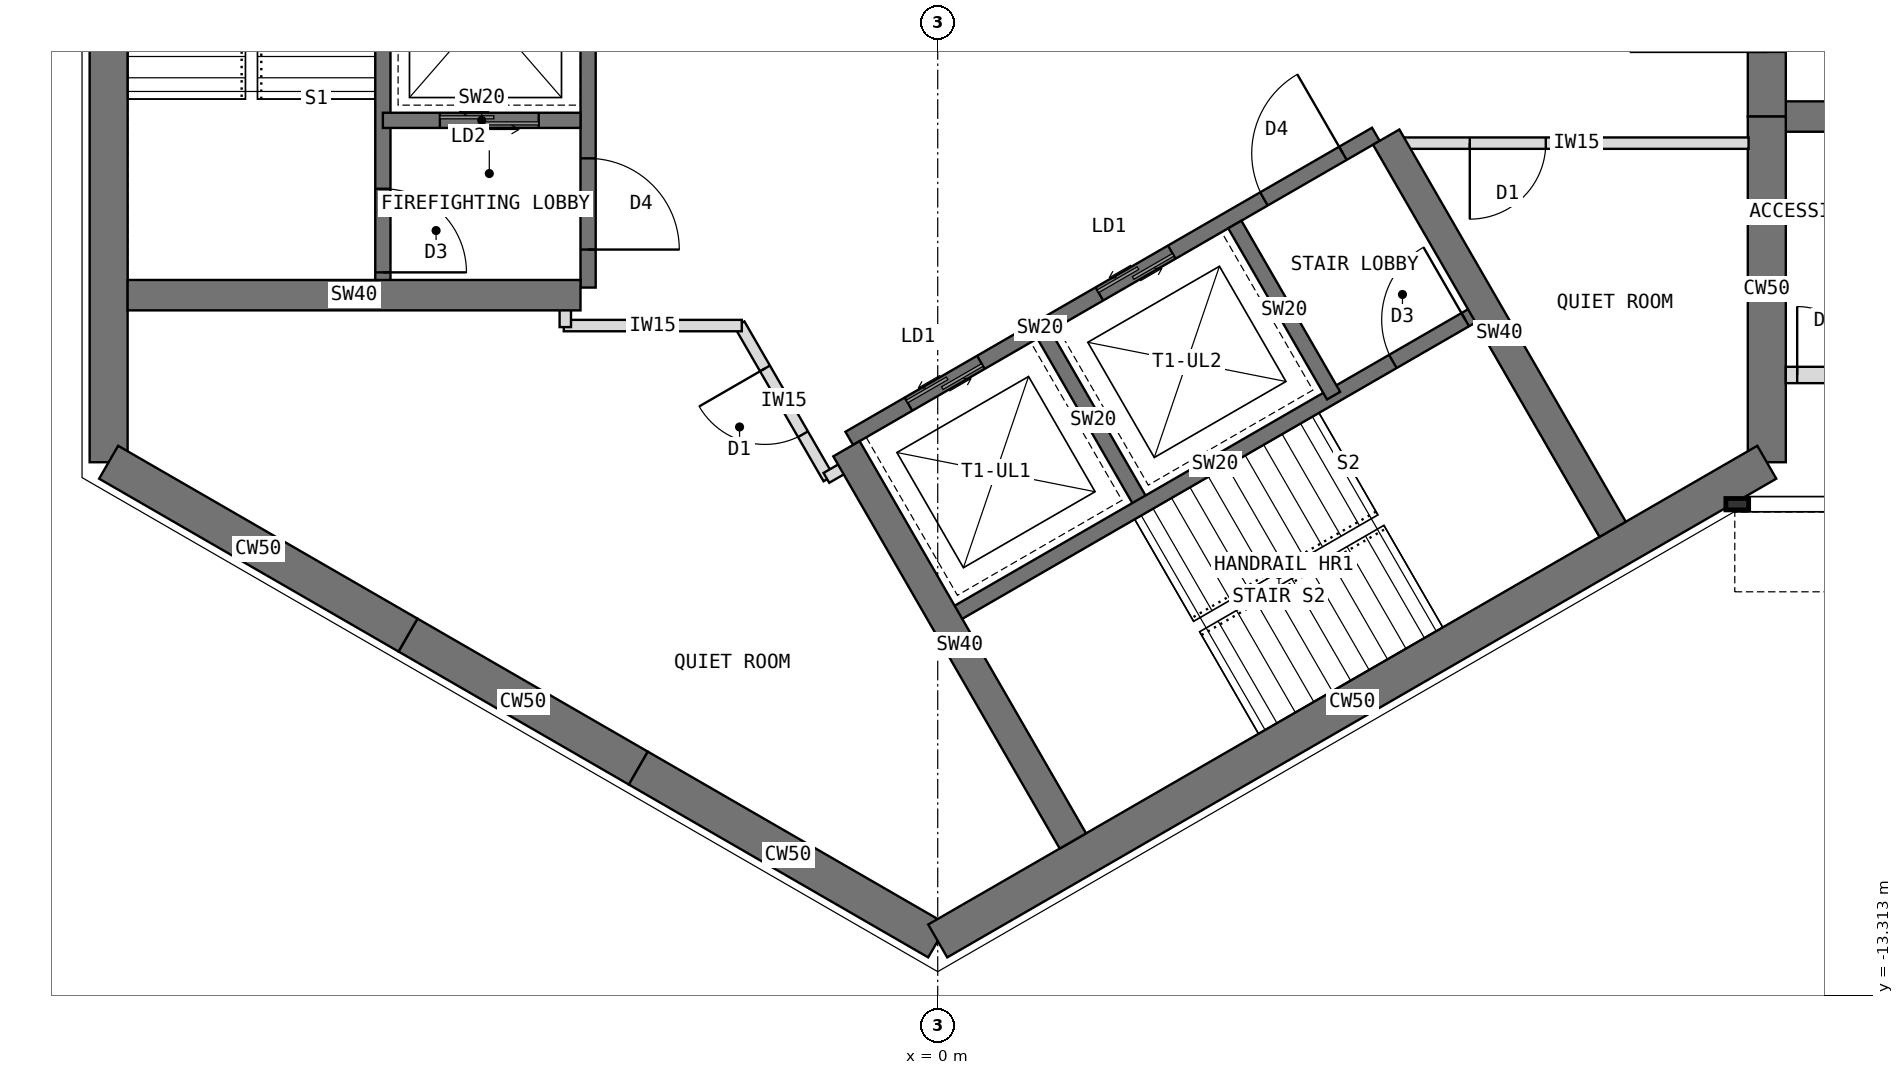
"""IFC4 building model, lengths in metres.
Left out: names, types, materials, properties, quantities, classifications, styles, units other than length and angle.
Written with IfcOpenShell. Run it as: python <this file> out.ifc"""

import sys

from ifc_helpers import new_model, si_unit, direction, frame, frame_2d, origin, place, context, subcontext, project, spatial, rectangle, extrude, element, fill, save


model = new_model("IFC4")
c1 = context("Model", 3, precision=1e-05, world=origin(), true_north=direction((0.0, 1.0)))
c2 = subcontext(c1, "Body", "Model", "MODEL_VIEW")
j1 = project(units=[si_unit("LENGTHUNIT", "METRE"), si_unit("PLANEANGLEUNIT", "RADIAN")], contexts=[c1])
p1 = place(None, origin())
s1 = spatial("IfcSite", under=j1, at=p1, CompositionType="ELEMENT")
p2 = place(p1, origin())
s2 = spatial("IfcBuilding", under=s1, at=p2, CompositionType="ELEMENT")
p3 = place(p2, frame((0.0, 0.0, 186.5)))
s3 = spatial("IfcBuildingStorey", under=s2, at=p3, CompositionType="ELEMENT", Elevation=186.5)
p4 = place(p3, frame((10.908, -6.298, 0.0), z_axis=(0.0, 0.0, 1.0), x_axis=(0.0, 1.0, 0.0)))
e1 = element("IfcWall", 1, at=p4, inside=s3, PredefinedType="SHEAR", context=c2, shape_type="SweptSolid", body=[
    extrude(rectangle(XDim=4.548, YDim=0.5, at=frame_2d((2.274, 0.0))), origin(), (0.0, 0.0, 1.0), 4.0),
])
p5 = place(p3, frame((10.908, -1.75, 0.0), z_axis=(0.0, 0.0, 1.0), x_axis=(0.0, 1.0, 0.0)))
e2 = element("IfcWall", 2, at=p5, inside=s3, PredefinedType="SHEAR", context=c2, shape_type="SweptSolid", body=[
    extrude(rectangle(XDim=3.5, YDim=0.5, at=frame_2d((1.75, 0.0))), origin(), (0.0, 0.0, 1.0), 4.0),
])
p6 = place(p5, frame((0.85, 0.0, 0.0)))
e3 = element("IfcOpeningElement", 3, at=p6, cuts=e2, PredefinedType="OPENING", context=c2, shape_type="SweptSolid", body=[
    extrude(rectangle(XDim=1.8, YDim=2.1, at=frame_2d((0.9, 1.05))), frame((0.0, 0.26, 0.0), z_axis=(0.0, -1.0, 0.0), x_axis=(1.0, 0.0, 0.0)), (0.0, 0.0, 1.0), 0.52),
])
p7 = place(p3, frame((-10.908, 6.298, 0.0), z_axis=(0.0, 0.0, 1.0), x_axis=(0.0, -1.0, 0.0)))
e4 = element("IfcWall", 4, at=p7, inside=s3, PredefinedType="SHEAR", context=c2, shape_type="SweptSolid", body=[
    extrude(rectangle(XDim=12.596, YDim=0.5, at=frame_2d((6.298, 0.0))), origin(), (0.0, 0.0, 1.0), 4.0),
])
p8 = place(p3, frame((-10.908, -6.298, 0.0), z_axis=(0.0, 0.0, 1.0), x_axis=(0.866034513004, -0.499984222037, 0.0)))
e5 = element("IfcWall", 5, at=p8, inside=s3, PredefinedType="SHEAR", context=c2, shape_type="SweptSolid", body=[
    extrude(rectangle(XDim=4.548, YDim=0.5, at=frame_2d((2.274, 0.0))), origin(), (0.0, 0.0, 1.0), 4.0),
])
p9 = place(p3, frame((-6.97, -8.572, 0.0), z_axis=(0.0, 0.0, 1.0), x_axis=(0.866019471182, -0.500010275428, 0.0)))
e6 = element("IfcWall", 6, at=p9, inside=s3, PredefinedType="SHEAR", context=c2, shape_type="SweptSolid", body=[
    extrude(rectangle(XDim=3.5, YDim=0.5, at=frame_2d((1.75, 0.0))), origin(), (0.0, 0.0, 1.0), 4.0),
])
p10 = place(p3, frame((-3.939, -10.322, 0.0), z_axis=(0.0, 0.0, 1.0), x_axis=(0.866011268655, -0.500024481964, 0.0)))
e7 = element("IfcWall", 7, at=p10, inside=s3, PredefinedType="SHEAR", context=c2, shape_type="SweptSolid", body=[
    extrude(rectangle(XDim=4.548, YDim=0.5, at=frame_2d((2.274, 0.0))), origin(), (0.0, 0.0, 1.0), 4.0),
])
p11 = place(p3, frame((0.0, -12.596, 0.0), z_axis=(0.0, 0.0, 1.0), x_axis=(0.866021940709, 0.500005998175, 0.0)))
e8 = element("IfcWall", 8, at=p11, inside=s3, PredefinedType="SHEAR", context=c2, shape_type="SweptSolid", body=[
    extrude(rectangle(XDim=12.596, YDim=0.5, at=frame_2d((6.298, 0.0))), origin(), (0.0, 0.0, 1.0), 4.0),
])
p12 = place(p3, frame((10.908, -1.75, 0.0), z_axis=(0.0, 0.0, 1.0), x_axis=(1.0, 0.0, 0.0)))
e9 = element("IfcWall", 9, at=p12, inside=s3, PredefinedType="SHEAR", context=c2, shape_type="SweptSolid", body=[
    extrude(rectangle(XDim=2.592, YDim=0.4, at=frame_2d((1.296, 0.0))), origin(), (0.0, 0.0, 1.0), 4.0),
])
p13 = place(p3, frame((-4.6, 4.0, 0.0), z_axis=(0.0, 0.0, 1.0), x_axis=(0.0, -1.0, 0.0)))
e10 = element("IfcWall", 10, at=p13, inside=s3, PredefinedType="SHEAR", context=c2, shape_type="SweptSolid", body=[
    extrude(rectangle(XDim=8.0, YDim=0.2, at=frame_2d((4.0, 0.0))), origin(), (0.0, 0.0, 1.0), 4.0),
])
p14 = place(p13, frame((6.3, 0.0, 0.0)))
e11 = element("IfcOpeningElement", 11, at=p14, cuts=e10, PredefinedType="OPENING", context=c2, shape_type="SweptSolid", body=[
    extrude(rectangle(XDim=1.2, YDim=2.1, at=frame_2d((0.6, 1.05))), frame((0.0, 0.11, 0.0), z_axis=(0.0, -1.0, 0.0), x_axis=(1.0, 0.0, 0.0)), (0.0, 0.0, 1.0), 0.22),
])
p15 = place(p13, frame((0.9, 0.0, 0.0)))
e12 = element("IfcOpeningElement", 12, at=p15, cuts=e10, PredefinedType="OPENING", context=c2, shape_type="SweptSolid", body=[
    extrude(rectangle(XDim=1.1, YDim=2.2, at=frame_2d((0.55, 1.1))), frame((0.0, 0.11, 0.0), z_axis=(0.0, -1.0, 0.0), x_axis=(1.0, 0.0, 0.0)), (0.0, 0.0, 1.0), 0.22),
])
p16 = place(p3, frame((-4.7, -1.8, 0.0), z_axis=(0.0, 0.0, 1.0), x_axis=(-1.0, 0.0, 0.0)))
e13 = element("IfcWall", 13, at=p16, inside=s3, PredefinedType="SHEAR", context=c2, shape_type="SweptSolid", body=[
    extrude(rectangle(XDim=2.6, YDim=0.2, at=frame_2d((1.3, 0.0))), origin(), (0.0, 0.0, 1.0), 4.0),
])
p17 = place(p16, frame((0.55, 0.0, 0.0)))
e14 = element("IfcOpeningElement", 14, at=p17, cuts=e13, PredefinedType="OPENING", context=c2, shape_type="SweptSolid", body=[
    extrude(rectangle(XDim=1.3, YDim=2.2, at=frame_2d((0.65, 1.1))), frame((0.0, 0.11, 0.0), z_axis=(0.0, -1.0, 0.0), x_axis=(1.0, 0.0, 0.0)), (0.0, 0.0, 1.0), 0.22),
])
p18 = place(p3, frame((-7.3, 4.0, 0.0), z_axis=(0.0, 0.0, 1.0), x_axis=(0.0, -1.0, 0.0)))
e15 = element("IfcWall", 15, at=p18, inside=s3, PredefinedType="SHEAR", context=c2, shape_type="SweptSolid", body=[
    extrude(rectangle(XDim=8.0, YDim=0.2, at=frame_2d((4.0, 0.0))), origin(), (0.0, 0.0, 1.0), 4.0),
])
p19 = place(p18, frame((6.7, 0.0, 0.0)))
e16 = element("IfcOpeningElement", 16, at=p19, cuts=e15, PredefinedType="OPENING", context=c2, shape_type="SweptSolid", body=[
    extrude(rectangle(XDim=1.1, YDim=2.1, at=frame_2d((0.55, 1.05))), frame((0.0, 0.11, 0.0), z_axis=(0.0, -1.0, 0.0), x_axis=(1.0, 0.0, 0.0)), (0.0, 0.0, 1.0), 0.22),
])
p20 = place(p3, frame((-4.7, -4.1, 0.0), z_axis=(0.0, 0.0, 1.0), x_axis=(-1.0, 0.0, 0.0)))
e17 = element("IfcWall", 17, at=p20, inside=s3, PredefinedType="SHEAR", context=c2, shape_type="SweptSolid", body=[
    extrude(rectangle(XDim=5.958, YDim=0.4, at=frame_2d((2.979, 0.0))), origin(), (0.0, 0.0, 1.0), 4.0),
])
p21 = place(p3, frame((-1.164, -5.984, 0.0), z_axis=(0.0, 0.0, 1.0), x_axis=(0.866026010844, 0.49999894854, 0.0)))
e18 = element("IfcWall", 18, at=p21, inside=s3, PredefinedType="SHEAR", context=c2, shape_type="SweptSolid", body=[
    extrude(rectangle(XDim=8.0, YDim=0.2, at=frame_2d((4.0, 0.0))), origin(), (0.0, 0.0, 1.0), 4.0),
])
p22 = place(p21, frame((6.3, 0.0, 0.0)))
e19 = element("IfcOpeningElement", 19, at=p22, cuts=e18, PredefinedType="OPENING", context=c2, shape_type="SweptSolid", body=[
    extrude(rectangle(XDim=1.2, YDim=2.1, at=frame_2d((0.6, 1.05))), frame((0.0, 0.11, 0.0), z_axis=(0.0, -1.0, 0.0), x_axis=(1.0, 0.0, 0.0)), (0.0, 0.0, 1.0), 0.22),
])
p23 = place(p21, frame((0.9, 0.0, 0.0)))
e20 = element("IfcOpeningElement", 20, at=p23, cuts=e18, PredefinedType="OPENING", context=c2, shape_type="SweptSolid", body=[
    extrude(rectangle(XDim=1.1, YDim=2.2, at=frame_2d((0.55, 1.1))), frame((0.0, 0.11, 0.0), z_axis=(0.0, -1.0, 0.0), x_axis=(1.0, 0.0, 0.0)), (0.0, 0.0, 1.0), 0.22),
])
p24 = place(p21, frame((3.8, 0.0, 0.0)))
e21 = element("IfcOpeningElement", 21, at=p24, cuts=e18, PredefinedType="OPENING", context=c2, shape_type="SweptSolid", body=[
    extrude(rectangle(XDim=1.1, YDim=2.2, at=frame_2d((0.55, 1.1))), frame((0.0, 0.11, 0.0), z_axis=(0.0, -1.0, 0.0), x_axis=(1.0, 0.0, 0.0)), (0.0, 0.0, 1.0), 0.22),
])
p25 = place(p3, frame((1.397, -4.62, 0.0), z_axis=(0.0, 0.0, 1.0), x_axis=(0.499936506574, -0.866062058628, 0.0)))
e22 = element("IfcWall", 22, at=p25, inside=s3, PredefinedType="SHEAR", context=c2, shape_type="SweptSolid", body=[
    extrude(rectangle(XDim=2.6, YDim=0.2, at=frame_2d((1.3, 0.0))), origin(), (0.0, 0.0, 1.0), 4.0),
])
p26 = place(p3, frame((3.909, -3.17, 0.0), z_axis=(0.0, 0.0, 1.0), x_axis=(0.49997716683, -0.86603858612, 0.0)))
e23 = element("IfcWall", 23, at=p26, inside=s3, PredefinedType="SHEAR", context=c2, shape_type="SweptSolid", body=[
    extrude(rectangle(XDim=2.6, YDim=0.2, at=frame_2d((1.3, 0.0))), origin(), (0.0, 0.0, 1.0), 4.0),
])
p27 = place(p3, frame((0.186, -8.322, 0.0), z_axis=(0.0, 0.0, 1.0), x_axis=(0.866026010844, 0.49999894854, 0.0)))
e24 = element("IfcWall", 24, at=p27, inside=s3, PredefinedType="SHEAR", context=c2, shape_type="SweptSolid", body=[
    extrude(rectangle(XDim=8.0, YDim=0.2, at=frame_2d((4.0, 0.0))), origin(), (0.0, 0.0, 1.0), 4.0),
])
p28 = place(p27, frame((6.7, 0.0, 0.0)))
e25 = element("IfcOpeningElement", 25, at=p28, cuts=e24, PredefinedType="OPENING", context=c2, shape_type="SweptSolid", body=[
    extrude(rectangle(XDim=1.1, YDim=2.1, at=frame_2d((0.55, 1.05))), frame((0.0, 0.11, 0.0), z_axis=(0.0, -1.0, 0.0), x_axis=(1.0, 0.0, 0.0)), (0.0, 0.0, 1.0), 0.22),
])
p29 = place(p3, frame((5.901, -2.02, 0.0), z_axis=(0.0, 0.0, 1.0), x_axis=(0.500003832394, -0.86602319114, 0.0)))
e26 = element("IfcWall", 26, at=p29, inside=s3, PredefinedType="SHEAR", context=c2, shape_type="SweptSolid", body=[
    extrude(rectangle(XDim=5.958, YDim=0.4, at=frame_2d((2.979, 0.0))), origin(), (0.0, 0.0, 1.0), 4.0),
])
p30 = place(p3, frame((-1.201, -6.12, 0.0), z_axis=(0.0, 0.0, 1.0), x_axis=(0.500021575205, -0.866012946976, 0.0)))
e27 = element("IfcWall", 27, at=p30, inside=s3, PredefinedType="SHEAR", context=c2, shape_type="SweptSolid", body=[
    extrude(rectangle(XDim=5.958, YDim=0.4, at=frame_2d((2.979, 0.0))), origin(), (0.0, 0.0, 1.0), 4.0),
])
p31 = place(p3, frame((11.158, -5.15, 0.0), z_axis=(0.0, 0.0, 1.0), x_axis=(1.0, 0.0, 0.0)))
e28 = element("IfcWall", 28, at=p31, inside=s3, PredefinedType="PARTITIONING", context=c2, shape_type="SweptSolid", body=[
    extrude(rectangle(XDim=2.4, YDim=0.215, at=frame_2d((1.2, 0.0))), origin(), (0.0, 0.0, 1.0), 3.8),
])
p32 = place(p31, frame((0.15, 0.0, 0.0)))
e29 = element("IfcOpeningElement", 29, at=p32, cuts=e28, PredefinedType="OPENING", context=c2, shape_type="SweptSolid", body=[
    extrude(rectangle(XDim=0.9, YDim=2.1, at=frame_2d((0.45, 1.05))), frame((0.0, 0.117, 0.0), z_axis=(0.0, -1.0, 0.0), x_axis=(1.0, 0.0, 0.0)), (0.0, 0.0, 1.0), 0.235),
])
p33 = place(p3, frame((-1.437, -6.511, 0.0), z_axis=(0.0, 0.0, 1.0), x_axis=(-0.500074377092, 0.865982457891, 0.0)))
e30 = element("IfcWall", 30, at=p33, inside=s3, PredefinedType="PARTITIONING", context=c2, shape_type="SweptSolid", body=[
    extrude(rectangle(XDim=2.342, YDim=0.15, at=frame_2d((1.171, 0.0))), origin(), (0.0, 0.0, 1.0), 3.8),
])
p34 = place(p33, frame((0.671, 0.0, 0.0)))
e31 = element("IfcOpeningElement", 31, at=p34, cuts=e30, PredefinedType="OPENING", context=c2, shape_type="SweptSolid", body=[
    extrude(rectangle(XDim=1.0, YDim=2.1, at=frame_2d((0.5, 1.05))), frame((0.0, 0.085, 0.0), z_axis=(0.0, -1.0, 0.0), x_axis=(1.0, 0.0, 0.0)), (0.0, 0.0, 1.0), 0.17),
])
p35 = place(p3, frame((-2.578, -4.5, 0.0), z_axis=(0.0, 0.0, 1.0), x_axis=(-1.0, 0.0, 0.0)))
e32 = element("IfcWall", 32, at=p35, inside=s3, PredefinedType="PARTITIONING", context=c2, shape_type="SweptSolid", body=[
    extrude(rectangle(XDim=2.342, YDim=0.15, at=frame_2d((1.171, 0.0))), origin(), (0.0, 0.0, 1.0), 3.8),
])
p36 = place(p3, frame((-4.9, -4.52, 0.0), z_axis=(0.0, 0.0, 1.0), x_axis=(0.0, 1.0, 0.0)))
e33 = element("IfcWall", 33, at=p36, inside=s3, PredefinedType="PARTITIONING", context=c2, shape_type="SweptSolid", body=[
    extrude(rectangle(XDim=0.43, YDim=0.15, at=frame_2d((0.215, 0.0))), origin(), (0.0, 0.0, 1.0), 3.8),
])
p37 = place(p3, frame((10.668, -2.1, 0.0), z_axis=(0.0, 0.0, 1.0), x_axis=(-1.0, 0.0, 0.0)))
e34 = element("IfcWall", 34, at=p37, inside=s3, PredefinedType="PARTITIONING", context=c2, shape_type="SweptSolid", body=[
    extrude(rectangle(XDim=4.526, YDim=0.15, at=frame_2d((2.263, 0.0))), origin(), (0.0, 0.0, 1.0), 3.8),
])
p38 = place(p37, frame((2.668, 0.0, 0.0)))
e35 = element("IfcOpeningElement", 35, at=p38, cuts=e34, PredefinedType="OPENING", context=c2, shape_type="SweptSolid", body=[
    extrude(rectangle(XDim=1.0, YDim=2.1, at=frame_2d((0.5, 1.05))), frame((0.0, 0.085, 0.0), z_axis=(0.0, -1.0, 0.0), x_axis=(1.0, 0.0, 0.0)), (0.0, 0.0, 1.0), 0.17),
])
p39 = place(p3, frame((-1.092, -6.289, 0.0), z_axis=(0.0, 0.0, 1.0), x_axis=(-0.866138304741, -0.499804398801, 0.0)))
e36 = element("IfcWall", 36, at=p39, inside=s3, PredefinedType="PARTITIONING", context=c2, shape_type="SweptSolid", body=[
    extrude(rectangle(XDim=0.43, YDim=0.15, at=frame_2d((0.215, 0.0))), origin(), (0.0, 0.0, 1.0), 3.8),
])
p40 = place(p14, origin())
e37 = element("IfcDoor", 37, at=p40, inside=s3, OperationType="SINGLE_SWING_RIGHT", PredefinedType="DOOR", context=c2, shape_type="SweptSolid", body=[
    extrude(rectangle(XDim=1.2, YDim=2.1, at=frame_2d((0.6, 1.05))), frame((0.0, 0.025, 0.0), z_axis=(0.0, -1.0, 0.0), x_axis=(1.0, 0.0, 0.0)), (0.0, 0.0, 1.0), 0.05),
])
fill(e11, e37)
p41 = place(p17, origin())
e38 = element("IfcDoor", 38, at=p41, inside=s3, OperationType="DOUBLE_DOOR_SLIDING", PredefinedType="DOOR", context=c2, shape_type="SweptSolid", body=[
    extrude(rectangle(XDim=1.3, YDim=2.2, at=frame_2d((0.65, 1.1))), frame((0.0, 0.025, 0.0), z_axis=(0.0, -1.0, 0.0), x_axis=(1.0, 0.0, 0.0)), (0.0, 0.0, 1.0), 0.05),
])
fill(e14, e38)
p42 = place(p19, origin())
e39 = element("IfcDoor", 39, at=p42, inside=s3, OperationType="SINGLE_SWING_RIGHT", PredefinedType="DOOR", context=c2, shape_type="SweptSolid", body=[
    extrude(rectangle(XDim=1.1, YDim=2.1, at=frame_2d((0.55, 1.05))), frame((0.0, 0.025, 0.0), z_axis=(0.0, -1.0, 0.0), x_axis=(1.0, 0.0, 0.0)), (0.0, 0.0, 1.0), 0.05),
])
fill(e16, e39)
p43 = place(p22, origin())
e40 = element("IfcDoor", 40, at=p43, inside=s3, OperationType="SINGLE_SWING_RIGHT", PredefinedType="DOOR", context=c2, shape_type="SweptSolid", body=[
    extrude(rectangle(XDim=1.2, YDim=2.1, at=frame_2d((0.6, 1.05))), frame((0.0, 0.025, 0.0), z_axis=(0.0, -1.0, 0.0), x_axis=(1.0, 0.0, 0.0)), (0.0, 0.0, 1.0), 0.05),
])
fill(e19, e40)
p44 = place(p23, origin())
e41 = element("IfcDoor", 41, at=p44, inside=s3, OperationType="DOUBLE_DOOR_SLIDING", PredefinedType="DOOR", context=c2, shape_type="SweptSolid", body=[
    extrude(rectangle(XDim=1.1, YDim=2.2, at=frame_2d((0.55, 1.1))), frame((0.0, 0.025, 0.0), z_axis=(0.0, -1.0, 0.0), x_axis=(1.0, 0.0, 0.0)), (0.0, 0.0, 1.0), 0.05),
])
fill(e20, e41)
p45 = place(p24, origin())
e42 = element("IfcDoor", 42, at=p45, inside=s3, OperationType="DOUBLE_DOOR_SLIDING", PredefinedType="DOOR", context=c2, shape_type="SweptSolid", body=[
    extrude(rectangle(XDim=1.1, YDim=2.2, at=frame_2d((0.55, 1.1))), frame((0.0, 0.025, 0.0), z_axis=(0.0, -1.0, 0.0), x_axis=(1.0, 0.0, 0.0)), (0.0, 0.0, 1.0), 0.05),
])
fill(e21, e42)
p46 = place(p28, origin())
e43 = element("IfcDoor", 43, at=p46, inside=s3, OperationType="SINGLE_SWING_RIGHT", PredefinedType="DOOR", context=c2, shape_type="SweptSolid", body=[
    extrude(rectangle(XDim=1.1, YDim=2.1, at=frame_2d((0.55, 1.05))), frame((0.0, 0.025, 0.0), z_axis=(0.0, -1.0, 0.0), x_axis=(1.0, 0.0, 0.0)), (0.0, 0.0, 1.0), 0.05),
])
fill(e25, e43)
p47 = place(p6, origin())
e44 = element("IfcDoor", 44, at=p47, inside=s3, OperationType="DOUBLE_DOOR_DOUBLE_SWING", PredefinedType="DOOR", context=c2, shape_type="SweptSolid", body=[
    extrude(rectangle(XDim=1.8, YDim=2.1, at=frame_2d((0.9, 1.05))), frame((0.0, 0.025, 0.0), z_axis=(0.0, -1.0, 0.0), x_axis=(1.0, 0.0, 0.0)), (0.0, 0.0, 1.0), 0.05),
])
fill(e3, e44)
p48 = place(p32, origin())
e45 = element("IfcDoor", 45, at=p48, inside=s3, OperationType="SINGLE_SWING_LEFT", PredefinedType="DOOR", context=c2, shape_type="SweptSolid", body=[
    extrude(rectangle(XDim=0.9, YDim=2.1, at=frame_2d((0.45, 1.05))), frame((0.0, 0.025, 0.0), z_axis=(0.0, -1.0, 0.0), x_axis=(1.0, 0.0, 0.0)), (0.0, 0.0, 1.0), 0.05),
])
fill(e29, e45)
p49 = place(p34, origin())
e46 = element("IfcDoor", 46, at=p49, inside=s3, OperationType="SINGLE_SWING_RIGHT", PredefinedType="DOOR", context=c2, shape_type="SweptSolid", body=[
    extrude(rectangle(XDim=1.0, YDim=2.1, at=frame_2d((0.5, 1.05))), frame((0.0, 0.025, 0.0), z_axis=(0.0, -1.0, 0.0), x_axis=(1.0, 0.0, 0.0)), (0.0, 0.0, 1.0), 0.05),
])
fill(e31, e46)
p50 = place(p38, origin())
e47 = element("IfcDoor", 47, at=p50, inside=s3, OperationType="SINGLE_SWING_RIGHT", PredefinedType="DOOR", context=c2, shape_type="SweptSolid", body=[
    extrude(rectangle(XDim=1.0, YDim=2.1, at=frame_2d((0.5, 1.05))), frame((0.0, 0.025, 0.0), z_axis=(0.0, -1.0, 0.0), x_axis=(1.0, 0.0, 0.0)), (0.0, 0.0, 1.0), 0.05),
])
fill(e35, e47)
save(model, sys.argv[1])
